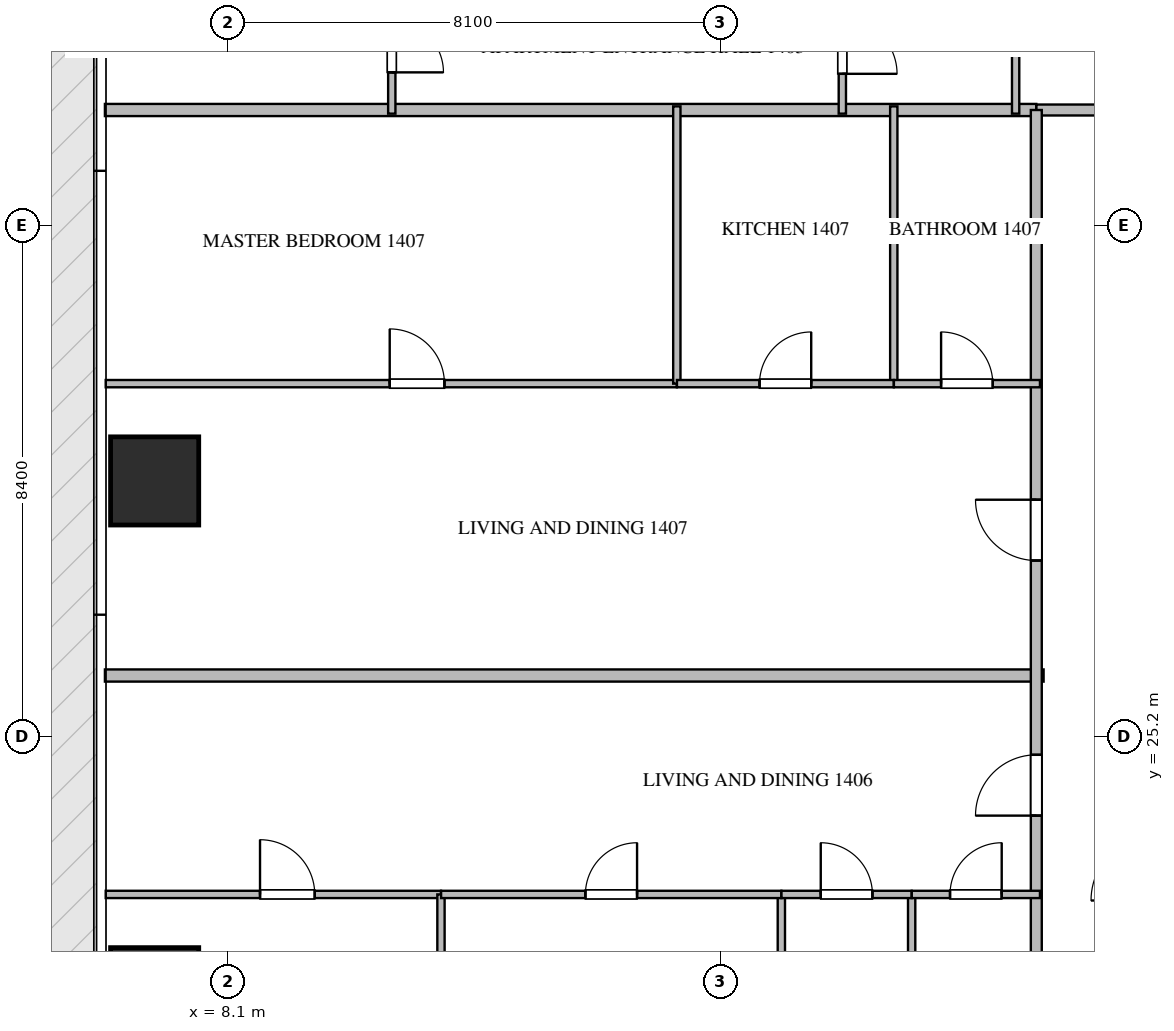
"""IFC4 building model, lengths in metres.
Left out: names, types, materials, properties, quantities, classifications, styles, units other than length and angle.
Written with IfcOpenShell. Run it as: python <this file> out.ifc"""

import sys

from ifc_helpers import new_model, si_unit, direction, frame, frame_2d, origin, origin_2d, place, context, subcontext, project, spatial, rectangle, extrude, source, transform, mapped, element, fill, save


model = new_model("IFC4")
c1 = context("Model", 3, precision=1e-05, world=origin(), true_north=direction((0.0, 1.0)))
c2 = subcontext(c1, "Body", "Model", "MODEL_VIEW")
j1 = project(units=[si_unit("LENGTHUNIT", "METRE"), si_unit("PLANEANGLEUNIT", "RADIAN")], contexts=[c1])
p1 = place(None, origin())
s1 = spatial("IfcSite", under=j1, at=p1, CompositionType="ELEMENT")
p2 = place(p1, origin())
s2 = spatial("IfcBuilding", under=s1, at=p2, CompositionType="ELEMENT")
p3 = place(p2, frame((0.0, 0.0, 60.45)))
s3 = spatial("IfcBuildingStorey", under=s2, at=p3, CompositionType="ELEMENT", Elevation=60.45)
m1 = source(origin(), c2, "Body", "SweptSolid", [
    extrude(rectangle(XDim=1.45, YDim=1.45, at=origin_2d()), origin(), (0.0, 0.0, 1.0), 3.75),
])
for number, where, z_axis, x_axis in (
    (1, (6.9, 21.0, -0.26), (0.0, 0.0, 1.0), (1.0, 0.0, 0.0)),
    (2, (6.9, 29.4, -0.26), (0.0, 0.0, 1.0), (1.0, 0.0, 0.0)),
):
    element("IfcColumn", number, at=place(p3, frame(where, z_axis=z_axis, x_axis=x_axis)), inside=s3, PredefinedType="COLUMN", context=c2, shape_type="MappedRepresentation", body=[
        mapped(m1, transform((0.0, 0.0, 0.0), scale=1.0)),
    ])
p4 = place(p3, frame((6.082, 26.2, 0.0), z_axis=(0.0, 0.0, 1.0), x_axis=(1.0, 0.0, 0.0)))
e3 = element("IfcWall", 3, at=p4, inside=s3, PredefinedType="PARTITIONING", context=c2, shape_type="SweptSolid", body=[
    extrude(rectangle(XDim=15.438, YDim=0.2, at=frame_2d((7.719, 0.0))), origin(), (0.0, 0.0, 1.0), 3.49),
])
p5 = place(p3, frame((6.082, 35.5, 0.0), z_axis=(0.0, 0.0, 1.0), x_axis=(1.0, 0.0, 0.0)))
e4 = element("IfcWall", 4, at=p5, inside=s3, PredefinedType="PARTITIONING", context=c2, shape_type="SweptSolid", body=[
    extrude(rectangle(XDim=15.318, YDim=0.2, at=frame_2d((7.659, 0.0))), origin(), (0.0, 0.0, 1.0), 3.49),
])
p6 = place(p3, frame((21.402, 35.5, 0.0), z_axis=(0.0, 0.0, 1.0), x_axis=(1.0, 0.0, 0.0)))
e5 = element("IfcWall", 5, at=p6, inside=s3, PredefinedType="PARTITIONING", context=c2, shape_type="SweptSolid", body=[
    extrude(rectangle(XDim=21.996, YDim=0.18, at=frame_2d((10.998, 0.0))), origin(), (0.0, 0.0, 1.0), 3.49),
])
p7 = place(p6, frame((2.1, 0.0, 0.0)))
e6 = element("IfcOpeningElement", 6, at=p7, cuts=e5, PredefinedType="OPENING", context=c2, shape_type="SweptSolid", body=[
    extrude(rectangle(XDim=1.0, YDim=2.15, at=frame_2d((0.5, 1.075))), frame((0.0, 0.1, 0.0), z_axis=(0.0, -1.0, 0.0), x_axis=(1.0, 0.0, 0.0)), (0.0, 0.0, 1.0), 0.2),
])
p8 = place(p6, frame((5.942, 0.0, 0.0)))
e7 = element("IfcOpeningElement", 7, at=p8, cuts=e5, PredefinedType="OPENING", context=c2, shape_type="SweptSolid", body=[
    extrude(rectangle(XDim=1.0, YDim=2.15, at=frame_2d((0.5, 1.075))), frame((0.0, 0.1, 0.0), z_axis=(0.0, -1.0, 0.0), x_axis=(1.0, 0.0, 0.0)), (0.0, 0.0, 1.0), 0.2),
])
p9 = place(p6, frame((16.272, 0.0, 0.0)))
e8 = element("IfcOpeningElement", 8, at=p9, cuts=e5, PredefinedType="OPENING", context=c2, shape_type="SweptSolid", body=[
    extrude(rectangle(XDim=1.0, YDim=2.15, at=frame_2d((0.5, 1.075))), frame((0.0, 0.1, 0.0), z_axis=(0.0, -1.0, 0.0), x_axis=(1.0, 0.0, 0.0)), (0.0, 0.0, 1.0), 0.2),
])
p10 = place(p3, frame((21.4, 14.9, 0.0), z_axis=(0.0, 0.0, 1.0), x_axis=(0.0, 1.0, 0.0)))
e9 = element("IfcWall", 9, at=p10, inside=s3, PredefinedType="PARTITIONING", context=c2, shape_type="SweptSolid", body=[
    extrude(rectangle(XDim=20.6, YDim=0.18, at=frame_2d((10.3, 0.0))), origin(), (0.0, 0.0, 1.0), 3.49),
])
p11 = place(p10, frame((8.996, 0.0, 0.0)))
e10 = element("IfcOpeningElement", 10, at=p11, cuts=e9, PredefinedType="OPENING", context=c2, shape_type="SweptSolid", body=[
    extrude(rectangle(XDim=1.0, YDim=2.15, at=frame_2d((0.5, 1.075))), frame((0.0, 0.1, 0.0), z_axis=(0.0, -1.0, 0.0), x_axis=(1.0, 0.0, 0.0)), (0.0, 0.0, 1.0), 0.2),
])
p12 = place(p10, frame((13.191, 0.0, 0.0)))
e11 = element("IfcOpeningElement", 11, at=p12, cuts=e9, PredefinedType="OPENING", context=c2, shape_type="SweptSolid", body=[
    extrude(rectangle(XDim=1.0, YDim=2.15, at=frame_2d((0.5, 1.075))), frame((0.0, 0.1, 0.0), z_axis=(0.0, -1.0, 0.0), x_axis=(1.0, 0.0, 0.0)), (0.0, 0.0, 1.0), 0.2),
])
p13 = place(p3, frame((21.06, 38.25, 0.0), z_axis=(0.0, 0.0, 1.0), x_axis=(0.0, -1.0, 0.0)))
e12 = element("IfcWall", 12, at=p13, inside=s3, PredefinedType="PARTITIONING", context=c2, shape_type="SweptSolid", body=[
    extrude(rectangle(XDim=2.81, YDim=0.12, at=frame_2d((1.405, 0.0))), origin(), (0.0, 0.0, 1.0), 3.49),
])
p14 = place(p3, frame((18.21, 37.65, 0.0), z_axis=(0.0, 0.0, 1.0), x_axis=(0.0, -1.0, 0.0)))
e13 = element("IfcWall", 13, at=p14, inside=s3, PredefinedType="PARTITIONING", context=c2, shape_type="SweptSolid", body=[
    extrude(rectangle(XDim=2.21, YDim=0.12, at=frame_2d((1.105, 0.0))), origin(), (0.0, 0.0, 1.0), 3.49),
])
p15 = place(p14, frame((0.655, 0.0, 0.0)))
e14 = element("IfcOpeningElement", 14, at=p15, cuts=e13, PredefinedType="OPENING", context=c2, shape_type="SweptSolid", body=[
    extrude(rectangle(XDim=0.9, YDim=2.1, at=frame_2d((0.45, 1.05))), frame((0.0, 0.07, 0.0), z_axis=(0.0, -1.0, 0.0), x_axis=(1.0, 0.0, 0.0)), (0.0, 0.0, 1.0), 0.14),
])
p16 = place(p3, frame((10.8, 37.648, 0.0), z_axis=(0.0, 0.0, 1.0), x_axis=(0.0, -1.0, 0.0)))
e15 = element("IfcWall", 15, at=p16, inside=s3, PredefinedType="PARTITIONING", context=c2, shape_type="SweptSolid", body=[
    extrude(rectangle(XDim=2.208, YDim=0.12, at=frame_2d((1.104, 0.0))), origin(), (0.0, 0.0, 1.0), 3.49),
])
p17 = place(p16, frame((0.679, 0.0, 0.0)))
e16 = element("IfcOpeningElement", 16, at=p17, cuts=e15, PredefinedType="OPENING", context=c2, shape_type="SweptSolid", body=[
    extrude(rectangle(XDim=0.85, YDim=2.1, at=frame_2d((0.425, 1.05))), frame((0.0, 0.07, 0.0), z_axis=(0.0, -1.0, 0.0), x_axis=(1.0, 0.0, 0.0)), (0.0, 0.0, 1.0), 0.14),
])
p18 = place(p3, frame((6.095, 22.6, 0.0), z_axis=(0.0, 0.0, 1.0), x_axis=(1.0, 0.0, 0.0)))
e17 = element("IfcWall", 17, at=p18, inside=s3, PredefinedType="PARTITIONING", context=c2, shape_type="SweptSolid", body=[
    extrude(rectangle(XDim=5.514, YDim=0.12, at=frame_2d((2.757, 0.0))), origin(), (0.0, 0.0, 1.0), 3.49),
])
p19 = place(p18, frame((2.538, 0.0, 0.0)))
e18 = element("IfcOpeningElement", 18, at=p19, cuts=e17, PredefinedType="OPENING", context=c2, shape_type="SweptSolid", body=[
    extrude(rectangle(XDim=0.9, YDim=2.1, at=frame_2d((0.45, 1.05))), frame((0.0, 0.07, 0.0), z_axis=(0.0, -1.0, 0.0), x_axis=(1.0, 0.0, 0.0)), (0.0, 0.0, 1.0), 0.14),
])
for number, where, z_axis, x_axis in (
    (19, (11.609, 14.84, 0.0), (0.0, 0.0, 1.0), (0.0, 1.0, 0.0)),
    (20, (17.207, 14.84, 0.0), (0.0, 0.0, 1.0), (0.0, 1.0, 0.0)),
    (21, (19.35, 14.84, 0.0), (0.0, 0.0, 1.0), (0.0, 1.0, 0.0)),
):
    element("IfcWall", number, at=place(p3, frame(where, z_axis=z_axis, x_axis=x_axis)), inside=s3, PredefinedType="PARTITIONING", context=c2, shape_type="SweptSolid", body=[
        extrude(rectangle(XDim=7.76, YDim=0.12, at=frame_2d((3.88, 0.0))), origin(), (0.0, 0.0, 1.0), 3.49),
    ])
p20 = place(p3, frame((11.611, 22.6, 0.0), z_axis=(0.0, 0.0, 1.0), x_axis=(1.0, 0.0, 0.0)))
e22 = element("IfcWall", 22, at=p20, inside=s3, PredefinedType="PARTITIONING", context=c2, shape_type="SweptSolid", body=[
    extrude(rectangle(XDim=5.596, YDim=0.12, at=frame_2d((2.798, 0.0))), origin(), (0.0, 0.0, 1.0), 3.49),
])
p21 = place(p20, frame((2.373, 0.0, 0.0)))
e23 = element("IfcOpeningElement", 23, at=p21, cuts=e22, PredefinedType="OPENING", context=c2, shape_type="SweptSolid", body=[
    extrude(rectangle(XDim=0.85, YDim=2.1, at=frame_2d((0.425, 1.05))), frame((0.0, 0.07, 0.0), z_axis=(0.0, -1.0, 0.0), x_axis=(1.0, 0.0, 0.0)), (0.0, 0.0, 1.0), 0.14),
])
p22 = place(p3, frame((17.209, 22.6, 0.0), z_axis=(0.0, 0.0, 1.0), x_axis=(1.0, 0.0, 0.0)))
e24 = element("IfcWall", 24, at=p22, inside=s3, PredefinedType="PARTITIONING", context=c2, shape_type="SweptSolid", body=[
    extrude(rectangle(XDim=2.141, YDim=0.12, at=frame_2d((1.071, 0.0))), origin(), (0.0, 0.0, 1.0), 3.49),
])
p23 = place(p22, frame((0.646, 0.0, 0.0)))
e25 = element("IfcOpeningElement", 25, at=p23, cuts=e24, PredefinedType="OPENING", context=c2, shape_type="SweptSolid", body=[
    extrude(rectangle(XDim=0.85, YDim=2.1, at=frame_2d((0.425, 1.05))), frame((0.0, 0.07, 0.0), z_axis=(0.0, -1.0, 0.0), x_axis=(1.0, 0.0, 0.0)), (0.0, 0.0, 1.0), 0.14),
])
p24 = place(p3, frame((19.352, 22.6, 0.0), z_axis=(0.0, 0.0, 1.0), x_axis=(1.0, 0.0, 0.0)))
e26 = element("IfcWall", 26, at=p24, inside=s3, PredefinedType="PARTITIONING", context=c2, shape_type="SweptSolid", body=[
    extrude(rectangle(XDim=2.108, YDim=0.12, at=frame_2d((1.054, 0.0))), origin(), (0.0, 0.0, 1.0), 3.49),
])
p25 = place(p24, frame((0.629, 0.0, 0.0)))
e27 = element("IfcOpeningElement", 27, at=p25, cuts=e26, PredefinedType="OPENING", context=c2, shape_type="SweptSolid", body=[
    extrude(rectangle(XDim=0.85, YDim=2.1, at=frame_2d((0.425, 1.05))), frame((0.0, 0.07, 0.0), z_axis=(0.0, -1.0, 0.0), x_axis=(1.0, 0.0, 0.0)), (0.0, 0.0, 1.0), 0.14),
])
p26 = place(p3, frame((6.095, 31.0, 0.0), z_axis=(0.0, 0.0, 1.0), x_axis=(1.0, 0.0, 0.0)))
e28 = element("IfcWall", 28, at=p26, inside=s3, PredefinedType="PARTITIONING", context=c2, shape_type="SweptSolid", body=[
    extrude(rectangle(XDim=9.393, YDim=0.12, at=frame_2d((4.697, 0.0))), origin(), (0.0, 0.0, 1.0), 3.49),
])
p27 = place(p26, frame((4.671, 0.0, 0.0)))
e29 = element("IfcOpeningElement", 29, at=p27, cuts=e28, PredefinedType="OPENING", context=c2, shape_type="SweptSolid", body=[
    extrude(rectangle(XDim=0.9, YDim=2.1, at=frame_2d((0.45, 1.05))), frame((0.0, 0.07, 0.0), z_axis=(0.0, -1.0, 0.0), x_axis=(1.0, 0.0, 0.0)), (0.0, 0.0, 1.0), 0.14),
])
p28 = place(p3, frame((15.488, 31.0, 0.0), z_axis=(0.0, 0.0, 1.0), x_axis=(0.0, 1.0, 0.0)))
e30 = element("IfcWall", 30, at=p28, inside=s3, PredefinedType="PARTITIONING", context=c2, shape_type="SweptSolid", body=[
    extrude(rectangle(XDim=4.56, YDim=0.12, at=frame_2d((2.28, 0.0))), origin(), (0.0, 0.0, 1.0), 2.922),
])
p29 = place(p3, frame((19.056, 31.0, 0.0), z_axis=(0.0, 0.0, 1.0), x_axis=(0.0, 1.0, 0.0)))
e31 = element("IfcWall", 31, at=p29, inside=s3, PredefinedType="PARTITIONING", context=c2, shape_type="SweptSolid", body=[
    extrude(rectangle(XDim=4.56, YDim=0.12, at=frame_2d((2.28, 0.0))), origin(), (0.0, 0.0, 1.0), 3.49),
])
p30 = place(p3, frame((15.49, 31.0, 0.0), z_axis=(0.0, 0.0, 1.0), x_axis=(1.0, 0.0, 0.0)))
e32 = element("IfcWall", 32, at=p30, inside=s3, PredefinedType="PARTITIONING", context=c2, shape_type="SweptSolid", body=[
    extrude(rectangle(XDim=3.566, YDim=0.12, at=frame_2d((1.783, 0.0))), origin(), (0.0, 0.0, 1.0), 3.49),
])
p31 = place(p30, frame((1.358, 0.0, 0.0)))
e33 = element("IfcOpeningElement", 33, at=p31, cuts=e32, PredefinedType="OPENING", context=c2, shape_type="SweptSolid", body=[
    extrude(rectangle(XDim=0.85, YDim=2.1, at=frame_2d((0.425, 1.05))), frame((0.0, 0.07, 0.0), z_axis=(0.0, -1.0, 0.0), x_axis=(1.0, 0.0, 0.0)), (0.0, 0.0, 1.0), 0.14),
])
p32 = place(p3, frame((19.058, 31.0, 0.0), z_axis=(0.0, 0.0, 1.0), x_axis=(1.0, 0.0, 0.0)))
e34 = element("IfcWall", 34, at=p32, inside=s3, PredefinedType="PARTITIONING", context=c2, shape_type="SweptSolid", body=[
    extrude(rectangle(XDim=2.402, YDim=0.12, at=frame_2d((1.201, 0.0))), origin(), (0.0, 0.0, 1.0), 3.49),
])
p33 = place(p32, frame((0.776, 0.0, 0.0)))
e35 = element("IfcOpeningElement", 35, at=p33, cuts=e34, PredefinedType="OPENING", context=c2, shape_type="SweptSolid", body=[
    extrude(rectangle(XDim=0.85, YDim=2.1, at=frame_2d((0.425, 1.05))), frame((0.0, 0.07, 0.0), z_axis=(0.0, -1.0, 0.0), x_axis=(1.0, 0.0, 0.0)), (0.0, 0.0, 1.0), 0.14),
])
m2 = source(origin(), c2, "Body", "SweptSolid", [
    extrude(rectangle(XDim=1.0, YDim=2.15, at=frame_2d((0.5, 1.075))), frame((0.0, 0.025, 0.0), z_axis=(0.0, -1.0, 0.0), x_axis=(1.0, 0.0, 0.0)), (0.0, 0.0, 1.0), 0.05),
])
p34 = place(p11, origin())
e36 = element("IfcDoor", 36, at=p34, inside=s3, OperationType="SINGLE_SWING_LEFT", PredefinedType="DOOR", context=c2, shape_type="MappedRepresentation", body=[
    mapped(m2, transform((0.0, 0.0, 0.0), scale=1.0)),
])
fill(e10, e36)
p35 = place(p12, origin())
e37 = element("IfcDoor", 37, at=p35, inside=s3, OperationType="SINGLE_SWING_RIGHT", PredefinedType="DOOR", context=c2, shape_type="MappedRepresentation", body=[
    mapped(m2, transform((0.0, 0.0, 0.0), scale=1.0)),
])
fill(e11, e37)
m3 = source(origin(), c2, "Body", "SweptSolid", [
    extrude(rectangle(XDim=0.9, YDim=2.1, at=frame_2d((0.45, 1.05))), frame((0.0, 0.025, 0.0), z_axis=(0.0, -1.0, 0.0), x_axis=(1.0, 0.0, 0.0)), (0.0, 0.0, 1.0), 0.05),
])
p36 = place(p15, origin())
e38 = element("IfcDoor", 38, at=p36, inside=s3, OperationType="SINGLE_SWING_RIGHT", PredefinedType="DOOR", context=c2, shape_type="MappedRepresentation", body=[
    mapped(m3, transform((0.0, 0.0, 0.0), scale=1.0)),
])
fill(e14, e38)
m4 = source(origin(), c2, "Body", "SweptSolid", [
    extrude(rectangle(XDim=0.85, YDim=2.1, at=frame_2d((0.425, 1.05))), frame((0.0, 0.025, 0.0), z_axis=(0.0, -1.0, 0.0), x_axis=(1.0, 0.0, 0.0)), (0.0, 0.0, 1.0), 0.05),
])
p37 = place(p17, origin())
e39 = element("IfcDoor", 39, at=p37, inside=s3, OperationType="SINGLE_SWING_RIGHT", PredefinedType="DOOR", context=c2, shape_type="MappedRepresentation", body=[
    mapped(m4, transform((0.0, 0.0, 0.0), scale=1.0)),
])
fill(e16, e39)
p38 = place(p19, origin())
e40 = element("IfcDoor", 40, at=p38, inside=s3, OperationType="SINGLE_SWING_LEFT", PredefinedType="DOOR", context=c2, shape_type="MappedRepresentation", body=[
    mapped(m3, transform((0.0, 0.0, 0.0), scale=1.0)),
])
fill(e18, e40)
p39 = place(p21, origin())
e41 = element("IfcDoor", 41, at=p39, inside=s3, OperationType="SINGLE_SWING_RIGHT", PredefinedType="DOOR", context=c2, shape_type="MappedRepresentation", body=[
    mapped(m4, transform((0.0, 0.0, 0.0), scale=1.0)),
])
fill(e23, e41)
p40 = place(p23, origin())
e42 = element("IfcDoor", 42, at=p40, inside=s3, OperationType="SINGLE_SWING_LEFT", PredefinedType="DOOR", context=c2, shape_type="MappedRepresentation", body=[
    mapped(m4, transform((0.0, 0.0, 0.0), scale=1.0)),
])
fill(e25, e42)
p41 = place(p25, origin())
e43 = element("IfcDoor", 43, at=p41, inside=s3, OperationType="SINGLE_SWING_RIGHT", PredefinedType="DOOR", context=c2, shape_type="MappedRepresentation", body=[
    mapped(m4, transform((0.0, 0.0, 0.0), scale=1.0)),
])
fill(e27, e43)
p42 = place(p27, origin())
e44 = element("IfcDoor", 44, at=p42, inside=s3, OperationType="SINGLE_SWING_LEFT", PredefinedType="DOOR", context=c2, shape_type="MappedRepresentation", body=[
    mapped(m3, transform((0.0, 0.0, 0.0), scale=1.0)),
])
fill(e29, e44)
p43 = place(p31, origin())
e45 = element("IfcDoor", 45, at=p43, inside=s3, OperationType="SINGLE_SWING_RIGHT", PredefinedType="DOOR", context=c2, shape_type="MappedRepresentation", body=[
    mapped(m4, transform((0.0, 0.0, 0.0), scale=1.0)),
])
fill(e33, e45)
p44 = place(p33, origin())
e46 = element("IfcDoor", 46, at=p44, inside=s3, OperationType="SINGLE_SWING_LEFT", PredefinedType="DOOR", context=c2, shape_type="MappedRepresentation", body=[
    mapped(m4, transform((0.0, 0.0, 0.0), scale=1.0)),
])
fill(e35, e46)
save(model, sys.argv[1])
